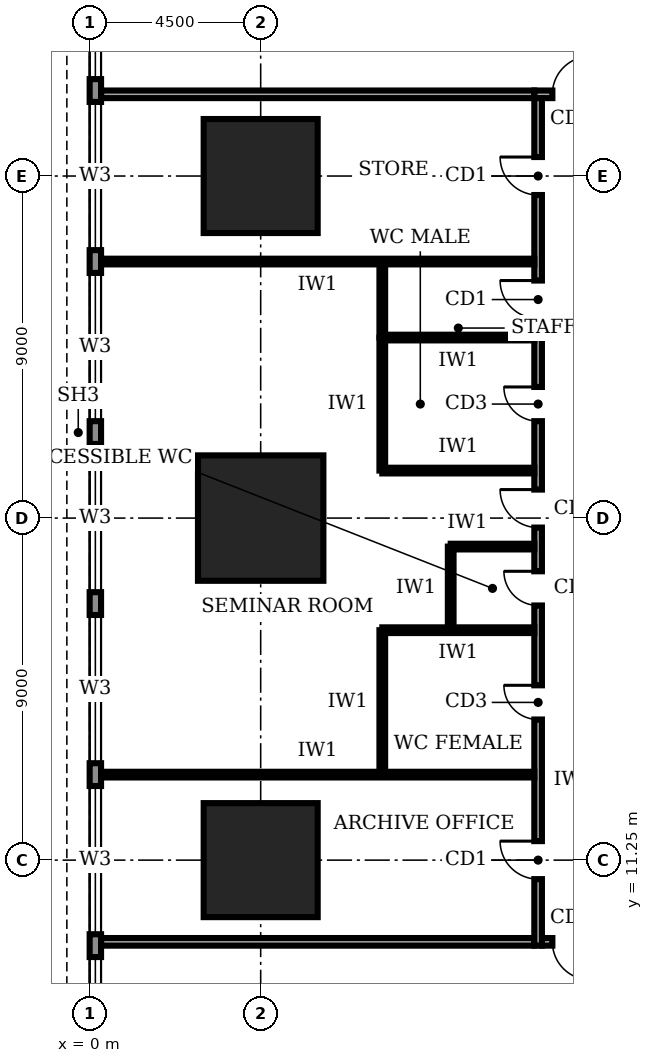
"""IFC4 building model, lengths in metres.
Left out: names, types, materials, properties, quantities, classifications, styles, units other than length and angle.
Written with IfcOpenShell. Run it as: python <this file> out.ifc"""

import sys

from ifc_helpers import new_model, si_unit, direction, frame, frame_2d, origin, origin_2d, place, context, subcontext, project, spatial, rectangle, extrude, element, fill, save


model = new_model("IFC4")
c1 = context("Model", 3, precision=1e-05, world=origin(), true_north=direction((0.0, 1.0)))
c2 = subcontext(c1, "Body", "Model", "MODEL_VIEW")
j1 = project(units=[si_unit("LENGTHUNIT", "METRE"), si_unit("PLANEANGLEUNIT", "RADIAN")], contexts=[c1])
p1 = place(None, origin())
s1 = spatial("IfcSite", under=j1, at=p1, CompositionType="ELEMENT")
p2 = place(p1, origin())
s2 = spatial("IfcBuilding", under=s1, at=p2, CompositionType="ELEMENT")
p3 = place(p2, frame((0.0, 0.0, 16.0)))
s3 = spatial("IfcBuildingStorey", under=s2, at=p3, CompositionType="ELEMENT", Elevation=16.0)
p4 = place(p3, frame((4.5, 11.25, 0.0), z_axis=(0.0, 0.0, 1.0), x_axis=(1.0, 0.0, 0.0)))
e1 = element("IfcColumn", 1, at=p4, inside=s3, PredefinedType="COLUMN", context=c2, shape_type="SweptSolid", body=[
    extrude(rectangle(XDim=3.0, YDim=3.0, at=origin_2d()), origin(), (0.0, 0.0, 1.0), 5.0),
])
p5 = place(p3, frame((4.5, 20.25, 0.0), z_axis=(0.0, 0.0, 1.0), x_axis=(1.0, 0.0, 0.0)))
e2 = element("IfcColumn", 2, at=p5, inside=s3, PredefinedType="COLUMN", context=c2, shape_type="SweptSolid", body=[
    extrude(rectangle(XDim=3.3, YDim=3.3, at=origin_2d()), origin(), (0.0, 0.0, 1.0), 5.0),
])
p6 = place(p3, frame((4.5, 29.25, 0.0), z_axis=(0.0, 0.0, 1.0), x_axis=(1.0, 0.0, 0.0)))
e3 = element("IfcColumn", 3, at=p6, inside=s3, PredefinedType="COLUMN", context=c2, shape_type="SweptSolid", body=[
    extrude(rectangle(XDim=3.0, YDim=3.0, at=origin_2d()), origin(), (0.0, 0.0, 1.0), 5.0),
])
p7 = place(p3, frame((0.15, 49.48, 0.0), z_axis=(0.0, 0.0, 1.0), x_axis=(0.0, -1.0, 0.0)))
e4 = element("IfcWall", 4, at=p7, inside=s3, PredefinedType="STANDARD", context=c2, shape_type="SweptSolid", body=[
    extrude(rectangle(XDim=53.96, YDim=0.3, at=frame_2d((26.98, 0.0))), origin(), (0.0, 0.0, 1.0), 4.7),
])
p8 = place(p7, frame((49.78, 0.0, 0.95)))
e5 = element("IfcOpeningElement", 5, at=p8, cuts=e4, PredefinedType="OPENING", context=c2, shape_type="SweptSolid", body=[
    extrude(rectangle(XDim=3.9, YDim=1.8, at=frame_2d((1.95, 0.9))), frame((0.0, 0.16, 0.0), z_axis=(0.0, -1.0, 0.0), x_axis=(1.0, 0.0, 0.0)), (0.0, 0.0, 1.0), 0.32),
])
p9 = place(p7, frame((45.28, 0.0, 0.95)))
e6 = element("IfcOpeningElement", 6, at=p9, cuts=e4, PredefinedType="OPENING", context=c2, shape_type="SweptSolid", body=[
    extrude(rectangle(XDim=3.9, YDim=1.8, at=frame_2d((1.95, 0.9))), frame((0.0, 0.16, 0.0), z_axis=(0.0, -1.0, 0.0), x_axis=(1.0, 0.0, 0.0)), (0.0, 0.0, 1.0), 0.32),
])
p10 = place(p7, frame((40.78, 0.0, 0.95)))
e7 = element("IfcOpeningElement", 7, at=p10, cuts=e4, PredefinedType="OPENING", context=c2, shape_type="SweptSolid", body=[
    extrude(rectangle(XDim=3.9, YDim=1.8, at=frame_2d((1.95, 0.9))), frame((0.0, 0.16, 0.0), z_axis=(0.0, -1.0, 0.0), x_axis=(1.0, 0.0, 0.0)), (0.0, 0.0, 1.0), 0.32),
])
p11 = place(p7, frame((36.28, 0.0, 0.95)))
e8 = element("IfcOpeningElement", 8, at=p11, cuts=e4, PredefinedType="OPENING", context=c2, shape_type="SweptSolid", body=[
    extrude(rectangle(XDim=3.9, YDim=1.8, at=frame_2d((1.95, 0.9))), frame((0.0, 0.16, 0.0), z_axis=(0.0, -1.0, 0.0), x_axis=(1.0, 0.0, 0.0)), (0.0, 0.0, 1.0), 0.32),
])
p12 = place(p7, frame((31.78, 0.0, 0.95)))
e9 = element("IfcOpeningElement", 9, at=p12, cuts=e4, PredefinedType="OPENING", context=c2, shape_type="SweptSolid", body=[
    extrude(rectangle(XDim=3.9, YDim=1.8, at=frame_2d((1.95, 0.9))), frame((0.0, 0.16, 0.0), z_axis=(0.0, -1.0, 0.0), x_axis=(1.0, 0.0, 0.0)), (0.0, 0.0, 1.0), 0.32),
])
p13 = place(p7, frame((27.28, 0.0, 0.95)))
e10 = element("IfcOpeningElement", 10, at=p13, cuts=e4, PredefinedType="OPENING", context=c2, shape_type="SweptSolid", body=[
    extrude(rectangle(XDim=3.9, YDim=1.8, at=frame_2d((1.95, 0.9))), frame((0.0, 0.16, 0.0), z_axis=(0.0, -1.0, 0.0), x_axis=(1.0, 0.0, 0.0)), (0.0, 0.0, 1.0), 0.32),
])
p14 = place(p7, frame((22.78, 0.0, 0.95)))
e11 = element("IfcOpeningElement", 11, at=p14, cuts=e4, PredefinedType="OPENING", context=c2, shape_type="SweptSolid", body=[
    extrude(rectangle(XDim=3.9, YDim=1.8, at=frame_2d((1.95, 0.9))), frame((0.0, 0.16, 0.0), z_axis=(0.0, -1.0, 0.0), x_axis=(1.0, 0.0, 0.0)), (0.0, 0.0, 1.0), 0.32),
])
p15 = place(p7, frame((18.28, 0.0, 0.95)))
e12 = element("IfcOpeningElement", 12, at=p15, cuts=e4, PredefinedType="OPENING", context=c2, shape_type="SweptSolid", body=[
    extrude(rectangle(XDim=3.9, YDim=1.8, at=frame_2d((1.95, 0.9))), frame((0.0, 0.16, 0.0), z_axis=(0.0, -1.0, 0.0), x_axis=(1.0, 0.0, 0.0)), (0.0, 0.0, 1.0), 0.32),
])
p16 = place(p7, frame((13.78, 0.0, 0.95)))
e13 = element("IfcOpeningElement", 13, at=p16, cuts=e4, PredefinedType="OPENING", context=c2, shape_type="SweptSolid", body=[
    extrude(rectangle(XDim=3.9, YDim=1.8, at=frame_2d((1.95, 0.9))), frame((0.0, 0.16, 0.0), z_axis=(0.0, -1.0, 0.0), x_axis=(1.0, 0.0, 0.0)), (0.0, 0.0, 1.0), 0.32),
])
p17 = place(p7, frame((9.28, 0.0, 0.95)))
e14 = element("IfcOpeningElement", 14, at=p17, cuts=e4, PredefinedType="OPENING", context=c2, shape_type="SweptSolid", body=[
    extrude(rectangle(XDim=3.9, YDim=1.8, at=frame_2d((1.95, 0.9))), frame((0.0, 0.16, 0.0), z_axis=(0.0, -1.0, 0.0), x_axis=(1.0, 0.0, 0.0)), (0.0, 0.0, 1.0), 0.32),
])
p18 = place(p7, frame((4.78, 0.0, 0.95)))
e15 = element("IfcOpeningElement", 15, at=p18, cuts=e4, PredefinedType="OPENING", context=c2, shape_type="SweptSolid", body=[
    extrude(rectangle(XDim=3.9, YDim=1.8, at=frame_2d((1.95, 0.9))), frame((0.0, 0.16, 0.0), z_axis=(0.0, -1.0, 0.0), x_axis=(1.0, 0.0, 0.0)), (0.0, 0.0, 1.0), 0.32),
])
p19 = place(p3, frame((11.9, 9.1, 0.0), z_axis=(0.0, 0.0, 1.0), x_axis=(1.0, 0.0, 0.0)))
e16 = element("IfcWall", 16, at=p19, inside=s3, PredefinedType="SOLIDWALL", context=c2, shape_type="SweptSolid", body=[
    extrude(rectangle(XDim=16.9, YDim=0.2, at=frame_2d((8.45, 0.0))), origin(), (0.0, 0.0, 1.0), 4.7),
])
p20 = place(p19, frame((0.275, 0.0, 0.0)))
e17 = element("IfcOpeningElement", 17, at=p20, cuts=e16, PredefinedType="OPENING", context=c2, shape_type="SweptSolid", body=[
    extrude(rectangle(XDim=1.0, YDim=2.1, at=frame_2d((0.5, 1.05))), frame((0.0, 0.11, 0.0), z_axis=(0.0, -1.0, 0.0), x_axis=(1.0, 0.0, 0.0)), (0.0, 0.0, 1.0), 0.22),
])
p21 = place(p19, frame((3.35, 0.0, 0.0)))
e18 = element("IfcOpeningElement", 18, at=p21, cuts=e16, PredefinedType="OPENING", context=c2, shape_type="SweptSolid", body=[
    extrude(rectangle(XDim=1.0, YDim=2.1, at=frame_2d((0.5, 1.05))), frame((0.0, 0.11, 0.0), z_axis=(0.0, -1.0, 0.0), x_axis=(1.0, 0.0, 0.0)), (0.0, 0.0, 1.0), 0.22),
])
p22 = place(p19, frame((9.7, 0.0, 0.0)))
e19 = element("IfcOpeningElement", 19, at=p22, cuts=e16, PredefinedType="OPENING", context=c2, shape_type="SweptSolid", body=[
    extrude(rectangle(XDim=1.8, YDim=2.1, at=frame_2d((0.9, 1.05))), frame((0.0, 0.11, 0.0), z_axis=(0.0, -1.0, 0.0), x_axis=(1.0, 0.0, 0.0)), (0.0, 0.0, 1.0), 0.22),
])
p23 = place(p19, frame((15.425, 0.0, 0.0)))
e20 = element("IfcOpeningElement", 20, at=p23, cuts=e16, PredefinedType="OPENING", context=c2, shape_type="SweptSolid", body=[
    extrude(rectangle(XDim=1.0, YDim=2.1, at=frame_2d((0.5, 1.05))), frame((0.0, 0.11, 0.0), z_axis=(0.0, -1.0, 0.0), x_axis=(1.0, 0.0, 0.0)), (0.0, 0.0, 1.0), 0.22),
])
p24 = place(p3, frame((28.6, 31.4, 0.0), z_axis=(0.0, 0.0, 1.0), x_axis=(-1.0, 0.0, 0.0)))
e21 = element("IfcWall", 21, at=p24, inside=s3, PredefinedType="SOLIDWALL", context=c2, shape_type="SweptSolid", body=[
    extrude(rectangle(XDim=16.9, YDim=0.2, at=frame_2d((8.45, 0.0))), origin(), (0.0, 0.0, 1.0), 4.7),
])
p25 = place(p24, frame((15.425, 0.0, 0.0)))
e22 = element("IfcOpeningElement", 22, at=p25, cuts=e21, PredefinedType="OPENING", context=c2, shape_type="SweptSolid", body=[
    extrude(rectangle(XDim=1.0, YDim=2.1, at=frame_2d((0.5, 1.05))), frame((0.0, 0.11, 0.0), z_axis=(0.0, -1.0, 0.0), x_axis=(1.0, 0.0, 0.0)), (0.0, 0.0, 1.0), 0.22),
])
p26 = place(p24, frame((9.7, 0.0, 0.0)))
e23 = element("IfcOpeningElement", 23, at=p26, cuts=e21, PredefinedType="OPENING", context=c2, shape_type="SweptSolid", body=[
    extrude(rectangle(XDim=1.8, YDim=2.1, at=frame_2d((0.9, 1.05))), frame((0.0, 0.11, 0.0), z_axis=(0.0, -1.0, 0.0), x_axis=(1.0, 0.0, 0.0)), (0.0, 0.0, 1.0), 0.22),
])
p27 = place(p24, frame((0.275, 0.0, 0.0)))
e24 = element("IfcOpeningElement", 24, at=p27, cuts=e21, PredefinedType="OPENING", context=c2, shape_type="SweptSolid", body=[
    extrude(rectangle(XDim=1.0, YDim=2.1, at=frame_2d((0.5, 1.05))), frame((0.0, 0.11, 0.0), z_axis=(0.0, -1.0, 0.0), x_axis=(1.0, 0.0, 0.0)), (0.0, 0.0, 1.0), 0.22),
])
p28 = place(p24, frame((3.35, 0.0, 0.0)))
e25 = element("IfcOpeningElement", 25, at=p28, cuts=e21, PredefinedType="OPENING", context=c2, shape_type="SweptSolid", body=[
    extrude(rectangle(XDim=1.0, YDim=2.1, at=frame_2d((0.5, 1.05))), frame((0.0, 0.11, 0.0), z_axis=(0.0, -1.0, 0.0), x_axis=(1.0, 0.0, 0.0)), (0.0, 0.0, 1.0), 0.22),
])
p29 = place(p3, frame((11.8, 31.3, 0.0), z_axis=(0.0, 0.0, 1.0), x_axis=(0.0, -1.0, 0.0)))
e26 = element("IfcWall", 26, at=p29, inside=s3, PredefinedType="SOLIDWALL", context=c2, shape_type="SweptSolid", body=[
    extrude(rectangle(XDim=22.3, YDim=0.2, at=frame_2d((11.15, 0.0))), origin(), (0.0, 0.0, 1.0), 4.7),
])
p30 = place(p29, frame((19.55, 0.0, 0.0)))
e27 = element("IfcOpeningElement", 27, at=p30, cuts=e26, PredefinedType="OPENING", context=c2, shape_type="SweptSolid", body=[
    extrude(rectangle(XDim=1.0, YDim=2.1, at=frame_2d((0.5, 1.05))), frame((0.0, 0.11, 0.0), z_axis=(0.0, -1.0, 0.0), x_axis=(1.0, 0.0, 0.0)), (0.0, 0.0, 1.0), 0.22),
])
p31 = place(p29, frame((15.45, 0.0, 0.0)))
e28 = element("IfcOpeningElement", 28, at=p31, cuts=e26, PredefinedType="OPENING", context=c2, shape_type="SweptSolid", body=[
    extrude(rectangle(XDim=0.9, YDim=2.1, at=frame_2d((0.45, 1.05))), frame((0.0, 0.11, 0.0), z_axis=(0.0, -1.0, 0.0), x_axis=(1.0, 0.0, 0.0)), (0.0, 0.0, 1.0), 0.22),
])
p32 = place(p29, frame((12.45, 0.0, 0.0)))
e29 = element("IfcOpeningElement", 29, at=p32, cuts=e26, PredefinedType="OPENING", context=c2, shape_type="SweptSolid", body=[
    extrude(rectangle(XDim=0.9, YDim=2.1, at=frame_2d((0.45, 1.05))), frame((0.0, 0.11, 0.0), z_axis=(0.0, -1.0, 0.0), x_axis=(1.0, 0.0, 0.0)), (0.0, 0.0, 1.0), 0.22),
])
p33 = place(p29, frame((7.6, 0.0, 0.0)))
e30 = element("IfcOpeningElement", 30, at=p33, cuts=e26, PredefinedType="OPENING", context=c2, shape_type="SweptSolid", body=[
    extrude(rectangle(XDim=0.9, YDim=2.1, at=frame_2d((0.45, 1.05))), frame((0.0, 0.11, 0.0), z_axis=(0.0, -1.0, 0.0), x_axis=(1.0, 0.0, 0.0)), (0.0, 0.0, 1.0), 0.22),
])
p34 = place(p29, frame((4.8, 0.0, 0.0)))
e31 = element("IfcOpeningElement", 31, at=p34, cuts=e26, PredefinedType="OPENING", context=c2, shape_type="SweptSolid", body=[
    extrude(rectangle(XDim=1.0, YDim=2.1, at=frame_2d((0.5, 1.05))), frame((0.0, 0.11, 0.0), z_axis=(0.0, -1.0, 0.0), x_axis=(1.0, 0.0, 0.0)), (0.0, 0.0, 1.0), 0.22),
])
p35 = place(p29, frame((10.3, 0.0, 0.0)))
e32 = element("IfcOpeningElement", 32, at=p35, cuts=e26, PredefinedType="OPENING", context=c2, shape_type="SweptSolid", body=[
    extrude(rectangle(XDim=1.0, YDim=2.1, at=frame_2d((0.5, 1.05))), frame((0.0, 0.11, 0.0), z_axis=(0.0, -1.0, 0.0), x_axis=(1.0, 0.0, 0.0)), (0.0, 0.0, 1.0), 0.22),
])
p36 = place(p29, frame((1.55, 0.0, 0.0)))
e33 = element("IfcOpeningElement", 33, at=p36, cuts=e26, PredefinedType="OPENING", context=c2, shape_type="SweptSolid", body=[
    extrude(rectangle(XDim=1.0, YDim=2.1, at=frame_2d((0.5, 1.05))), frame((0.0, 0.11, 0.0), z_axis=(0.0, -1.0, 0.0), x_axis=(1.0, 0.0, 0.0)), (0.0, 0.0, 1.0), 0.22),
])
for number, where, z_axis, x_axis in (
    (34, (0.3, 9.1, 0.0), (0.0, 0.0, 1.0), (1.0, 0.0, 0.0)),
    (35, (0.3, 31.4, 0.0), (0.0, 0.0, 1.0), (1.0, 0.0, 0.0)),
):
    element("IfcWall", number, at=place(p3, frame(where, z_axis=z_axis, x_axis=x_axis)), inside=s3, PredefinedType="SOLIDWALL", context=c2, shape_type="SweptSolid", body=[
        extrude(rectangle(XDim=11.4, YDim=0.2, at=frame_2d((5.7, 0.0))), origin(), (0.0, 0.0, 1.0), 4.7),
    ])
for number, where, z_axis, x_axis in (
    (36, (0.3, 13.5, 0.0), (0.0, 0.0, 1.0), (1.0, 0.0, 0.0)),
    (37, (0.3, 27.0, 0.0), (0.0, 0.0, 1.0), (1.0, 0.0, 0.0)),
):
    element("IfcWall", number, at=place(p3, frame(where, z_axis=z_axis, x_axis=x_axis)), inside=s3, PredefinedType="PARTITIONING", context=c2, shape_type="SweptSolid", body=[
        extrude(rectangle(XDim=11.4, YDim=0.15, at=frame_2d((5.7, 0.0))), origin(), (0.0, 0.0, 1.0), 4.7),
    ])
p37 = place(p3, frame((11.7, 17.3, 0.0), z_axis=(0.0, 0.0, 1.0), x_axis=(-1.0, 0.0, 0.0)))
e38 = element("IfcWall", 38, at=p37, inside=s3, PredefinedType="PARTITIONING", context=c2, shape_type="SweptSolid", body=[
    extrude(rectangle(XDim=4.0, YDim=0.15, at=frame_2d((2.0, 0.0))), origin(), (0.0, 0.0, 1.0), 4.7),
])
p38 = place(p3, frame((11.7, 19.5, 0.0), z_axis=(0.0, 0.0, 1.0), x_axis=(-1.0, 0.0, 0.0)))
e39 = element("IfcWall", 39, at=p38, inside=s3, PredefinedType="PARTITIONING", context=c2, shape_type="SweptSolid", body=[
    extrude(rectangle(XDim=2.2, YDim=0.15, at=frame_2d((1.1, 0.0))), origin(), (0.0, 0.0, 1.0), 3.8),
])
for number, where, z_axis, x_axis in (
    (40, (11.7, 21.5, 0.0), (0.0, 0.0, 1.0), (-1.0, 0.0, 0.0)),
    (41, (11.7, 25.0, 0.0), (0.0, 0.0, 1.0), (-1.0, 0.0, 0.0)),
):
    element("IfcWall", number, at=place(p3, frame(where, z_axis=z_axis, x_axis=x_axis)), inside=s3, PredefinedType="PARTITIONING", context=c2, shape_type="SweptSolid", body=[
        extrude(rectangle(XDim=4.0, YDim=0.15, at=frame_2d((2.0, 0.0))), origin(), (0.0, 0.0, 1.0), 4.7),
    ])
p39 = place(p3, frame((7.7, 13.5, 0.0), z_axis=(0.0, 0.0, 1.0), x_axis=(0.0, 1.0, 0.0)))
e42 = element("IfcWall", 42, at=p39, inside=s3, PredefinedType="PARTITIONING", context=c2, shape_type="SweptSolid", body=[
    extrude(rectangle(XDim=3.8, YDim=0.15, at=frame_2d((1.9, 0.0))), origin(), (0.0, 0.0, 1.0), 4.7),
])
p40 = place(p3, frame((9.5, 17.3, 0.0), z_axis=(0.0, 0.0, 1.0), x_axis=(0.0, 1.0, 0.0)))
e43 = element("IfcWall", 43, at=p40, inside=s3, PredefinedType="PARTITIONING", context=c2, shape_type="SweptSolid", body=[
    extrude(rectangle(XDim=2.2, YDim=0.15, at=frame_2d((1.1, 0.0))), origin(), (0.0, 0.0, 1.0), 4.7),
])
p41 = place(p3, frame((7.7, 21.5, 0.0), z_axis=(0.0, 0.0, 1.0), x_axis=(0.0, 1.0, 0.0)))
e44 = element("IfcWall", 44, at=p41, inside=s3, PredefinedType="PARTITIONING", context=c2, shape_type="SweptSolid", body=[
    extrude(rectangle(XDim=3.5, YDim=0.15, at=frame_2d((1.75, 0.0))), origin(), (0.0, 0.0, 1.0), 4.7),
])
p42 = place(p3, frame((7.7, 25.0, 0.0), z_axis=(0.0, 0.0, 1.0), x_axis=(0.0, 1.0, 0.0)))
e45 = element("IfcWall", 45, at=p42, inside=s3, PredefinedType="PARTITIONING", context=c2, shape_type="SweptSolid", body=[
    extrude(rectangle(XDim=2.0, YDim=0.15, at=frame_2d((1.0, 0.0))), origin(), (0.0, 0.0, 1.0), 4.7),
])
p43 = place(p10, origin())
e46 = element("IfcWindow", 46, at=p43, inside=s3, PartitioningType="SINGLE_PANEL", PredefinedType="WINDOW", context=c2, shape_type="SweptSolid", body=[
    extrude(rectangle(XDim=3.9, YDim=1.8, at=frame_2d((1.95, 0.9))), frame((0.0, 0.03, 0.0), z_axis=(0.0, -1.0, 0.0), x_axis=(1.0, 0.0, 0.0)), (0.0, 0.0, 1.0), 0.06),
])
fill(e7, e46)
p44 = place(p11, origin())
e47 = element("IfcWindow", 47, at=p44, inside=s3, PartitioningType="SINGLE_PANEL", PredefinedType="WINDOW", context=c2, shape_type="SweptSolid", body=[
    extrude(rectangle(XDim=3.9, YDim=1.8, at=frame_2d((1.95, 0.9))), frame((0.0, 0.03, 0.0), z_axis=(0.0, -1.0, 0.0), x_axis=(1.0, 0.0, 0.0)), (0.0, 0.0, 1.0), 0.06),
])
fill(e8, e47)
p45 = place(p12, origin())
e48 = element("IfcWindow", 48, at=p45, inside=s3, PartitioningType="SINGLE_PANEL", PredefinedType="WINDOW", context=c2, shape_type="SweptSolid", body=[
    extrude(rectangle(XDim=3.9, YDim=1.8, at=frame_2d((1.95, 0.9))), frame((0.0, 0.03, 0.0), z_axis=(0.0, -1.0, 0.0), x_axis=(1.0, 0.0, 0.0)), (0.0, 0.0, 1.0), 0.06),
])
fill(e9, e48)
p46 = place(p13, origin())
e49 = element("IfcWindow", 49, at=p46, inside=s3, PartitioningType="SINGLE_PANEL", PredefinedType="WINDOW", context=c2, shape_type="SweptSolid", body=[
    extrude(rectangle(XDim=3.9, YDim=1.8, at=frame_2d((1.95, 0.9))), frame((0.0, 0.03, 0.0), z_axis=(0.0, -1.0, 0.0), x_axis=(1.0, 0.0, 0.0)), (0.0, 0.0, 1.0), 0.06),
])
fill(e10, e49)
p47 = place(p14, origin())
e50 = element("IfcWindow", 50, at=p47, inside=s3, PartitioningType="SINGLE_PANEL", PredefinedType="WINDOW", context=c2, shape_type="SweptSolid", body=[
    extrude(rectangle(XDim=3.9, YDim=1.8, at=frame_2d((1.95, 0.9))), frame((0.0, 0.03, 0.0), z_axis=(0.0, -1.0, 0.0), x_axis=(1.0, 0.0, 0.0)), (0.0, 0.0, 1.0), 0.06),
])
fill(e11, e50)
p48 = place(p15, origin())
e51 = element("IfcWindow", 51, at=p48, inside=s3, PartitioningType="SINGLE_PANEL", PredefinedType="WINDOW", context=c2, shape_type="SweptSolid", body=[
    extrude(rectangle(XDim=3.9, YDim=1.8, at=frame_2d((1.95, 0.9))), frame((0.0, 0.03, 0.0), z_axis=(0.0, -1.0, 0.0), x_axis=(1.0, 0.0, 0.0)), (0.0, 0.0, 1.0), 0.06),
])
fill(e12, e51)
p49 = place(p16, origin())
e52 = element("IfcWindow", 52, at=p49, inside=s3, PartitioningType="SINGLE_PANEL", PredefinedType="WINDOW", context=c2, shape_type="SweptSolid", body=[
    extrude(rectangle(XDim=3.9, YDim=1.8, at=frame_2d((1.95, 0.9))), frame((0.0, 0.03, 0.0), z_axis=(0.0, -1.0, 0.0), x_axis=(1.0, 0.0, 0.0)), (0.0, 0.0, 1.0), 0.06),
])
fill(e13, e52)
p50 = place(p20, frame((1.0, 0.0, 0.0), z_axis=(0.0, 0.0, 1.0), x_axis=(-1.0, 0.0, 0.0)))
e53 = element("IfcDoor", 53, at=p50, inside=s3, OperationType="SINGLE_SWING_LEFT", PredefinedType="DOOR", context=c2, shape_type="SweptSolid", body=[
    extrude(rectangle(XDim=1.0, YDim=2.1, at=frame_2d((0.5, 1.05))), frame((0.0, 0.025, 0.0), z_axis=(0.0, -1.0, 0.0), x_axis=(1.0, 0.0, 0.0)), (0.0, 0.0, 1.0), 0.05),
])
fill(e17, e53)
p51 = place(p25, frame((1.0, 0.0, 0.0), z_axis=(0.0, 0.0, 1.0), x_axis=(-1.0, 0.0, 0.0)))
e54 = element("IfcDoor", 54, at=p51, inside=s3, OperationType="SINGLE_SWING_RIGHT", PredefinedType="DOOR", context=c2, shape_type="SweptSolid", body=[
    extrude(rectangle(XDim=1.0, YDim=2.1, at=frame_2d((0.5, 1.05))), frame((0.0, 0.025, 0.0), z_axis=(0.0, -1.0, 0.0), x_axis=(1.0, 0.0, 0.0)), (0.0, 0.0, 1.0), 0.05),
])
fill(e22, e54)
p52 = place(p30, frame((1.0, 0.0, 0.0), z_axis=(0.0, 0.0, 1.0), x_axis=(-1.0, 0.0, 0.0)))
e55 = element("IfcDoor", 55, at=p52, inside=s3, OperationType="SINGLE_SWING_RIGHT", PredefinedType="DOOR", context=c2, shape_type="SweptSolid", body=[
    extrude(rectangle(XDim=1.0, YDim=2.1, at=frame_2d((0.5, 1.05))), frame((0.0, 0.025, 0.0), z_axis=(0.0, -1.0, 0.0), x_axis=(1.0, 0.0, 0.0)), (0.0, 0.0, 1.0), 0.05),
])
fill(e27, e55)
p53 = place(p31, frame((0.9, 0.0, 0.0), z_axis=(0.0, 0.0, 1.0), x_axis=(-1.0, 0.0, 0.0)))
e56 = element("IfcDoor", 56, at=p53, inside=s3, OperationType="SINGLE_SWING_RIGHT", PredefinedType="DOOR", context=c2, shape_type="SweptSolid", body=[
    extrude(rectangle(XDim=0.9, YDim=2.1, at=frame_2d((0.45, 1.05))), frame((0.0, 0.025, 0.0), z_axis=(0.0, -1.0, 0.0), x_axis=(1.0, 0.0, 0.0)), (0.0, 0.0, 1.0), 0.05),
])
fill(e28, e56)
p54 = place(p32, frame((0.9, 0.0, 0.0), z_axis=(0.0, 0.0, 1.0), x_axis=(-1.0, 0.0, 0.0)))
e57 = element("IfcDoor", 57, at=p54, inside=s3, OperationType="SINGLE_SWING_RIGHT", PredefinedType="DOOR", context=c2, shape_type="SweptSolid", body=[
    extrude(rectangle(XDim=0.9, YDim=2.1, at=frame_2d((0.45, 1.05))), frame((0.0, 0.025, 0.0), z_axis=(0.0, -1.0, 0.0), x_axis=(1.0, 0.0, 0.0)), (0.0, 0.0, 1.0), 0.05),
])
fill(e29, e57)
p55 = place(p33, frame((0.9, 0.0, 0.0), z_axis=(0.0, 0.0, 1.0), x_axis=(-1.0, 0.0, 0.0)))
e58 = element("IfcDoor", 58, at=p55, inside=s3, OperationType="SINGLE_SWING_RIGHT", PredefinedType="DOOR", context=c2, shape_type="SweptSolid", body=[
    extrude(rectangle(XDim=0.9, YDim=2.1, at=frame_2d((0.45, 1.05))), frame((0.0, 0.025, 0.0), z_axis=(0.0, -1.0, 0.0), x_axis=(1.0, 0.0, 0.0)), (0.0, 0.0, 1.0), 0.05),
])
fill(e30, e58)
p56 = place(p34, frame((1.0, 0.0, 0.0), z_axis=(0.0, 0.0, 1.0), x_axis=(-1.0, 0.0, 0.0)))
e59 = element("IfcDoor", 59, at=p56, inside=s3, OperationType="SINGLE_SWING_RIGHT", PredefinedType="DOOR", context=c2, shape_type="SweptSolid", body=[
    extrude(rectangle(XDim=1.0, YDim=2.1, at=frame_2d((0.5, 1.05))), frame((0.0, 0.025, 0.0), z_axis=(0.0, -1.0, 0.0), x_axis=(1.0, 0.0, 0.0)), (0.0, 0.0, 1.0), 0.05),
])
fill(e31, e59)
p57 = place(p35, frame((1.0, 0.0, 0.0), z_axis=(0.0, 0.0, 1.0), x_axis=(-1.0, 0.0, 0.0)))
e60 = element("IfcDoor", 60, at=p57, inside=s3, OperationType="SINGLE_SWING_RIGHT", PredefinedType="DOOR", context=c2, shape_type="SweptSolid", body=[
    extrude(rectangle(XDim=1.0, YDim=2.1, at=frame_2d((0.5, 1.05))), frame((0.0, 0.025, 0.0), z_axis=(0.0, -1.0, 0.0), x_axis=(1.0, 0.0, 0.0)), (0.0, 0.0, 1.0), 0.05),
])
fill(e32, e60)
p58 = place(p36, frame((1.0, 0.0, 0.0), z_axis=(0.0, 0.0, 1.0), x_axis=(-1.0, 0.0, 0.0)))
e61 = element("IfcDoor", 61, at=p58, inside=s3, OperationType="SINGLE_SWING_RIGHT", PredefinedType="DOOR", context=c2, shape_type="SweptSolid", body=[
    extrude(rectangle(XDim=1.0, YDim=2.1, at=frame_2d((0.5, 1.05))), frame((0.0, 0.025, 0.0), z_axis=(0.0, -1.0, 0.0), x_axis=(1.0, 0.0, 0.0)), (0.0, 0.0, 1.0), 0.05),
])
fill(e33, e61)
save(model, sys.argv[1])
